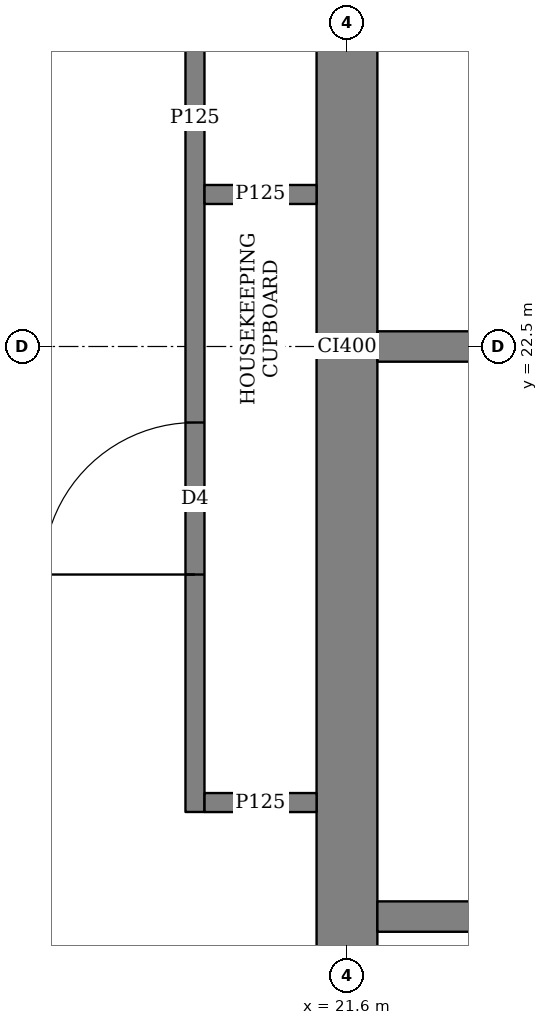
"""IFC4 building model, lengths in metres.
Left out: names, types, materials, properties, quantities, classifications, styles, units other than length and angle.
Written with IfcOpenShell. Run it as: python <this file> out.ifc"""

import sys

from ifc_helpers import new_model, si_unit, direction, frame, frame_2d, origin, place, context, subcontext, project, spatial, rectangle, extrude, element, fill, save


model = new_model("IFC4")
c1 = context("Model", 3, precision=1e-05, world=origin(), true_north=direction((0.0, 1.0)))
c2 = subcontext(c1, "Body", "Model", "MODEL_VIEW")
j1 = project(units=[si_unit("LENGTHUNIT", "METRE"), si_unit("PLANEANGLEUNIT", "RADIAN")], contexts=[c1])
p1 = place(None, origin())
s1 = spatial("IfcSite", under=j1, at=p1, CompositionType="ELEMENT")
p2 = place(p1, origin())
s2 = spatial("IfcBuilding", under=s1, at=p2, CompositionType="ELEMENT")
p3 = place(p2, frame((0.0, 0.0, 89.15)))
s3 = spatial("IfcBuildingStorey", under=s2, at=p3, CompositionType="ELEMENT", Elevation=89.15)
p4 = place(p3, frame((21.6, 15.45, 0.0), z_axis=(0.0, 0.0, 1.0), x_axis=(0.0, 1.0, 0.0)))
e1 = element("IfcWall", 1, at=p4, inside=s3, PredefinedType="SHEAR", context=c2, shape_type="SweptSolid", body=[
    extrude(rectangle(XDim=14.1, YDim=0.4, at=frame_2d((7.05, 0.0))), origin(), (0.0, 0.0, 1.0), 3.75),
])
p5 = place(p3, frame((20.6, 19.438, 0.0), z_axis=(0.0, 0.0, 1.0), x_axis=(0.0, 1.0, 0.0)))
e2 = element("IfcWall", 2, at=p5, inside=s3, PredefinedType="PARTITIONING", context=c2, shape_type="SweptSolid", body=[
    extrude(rectangle(XDim=9.124, YDim=0.125, at=frame_2d((4.562, 0.0))), origin(), (0.0, 0.0, 1.0), 3.5),
])
p6 = place(p5, frame((1.562, 0.0, 0.0)))
e3 = element("IfcOpeningElement", 3, at=p6, cuts=e2, PredefinedType="OPENING", context=c2, shape_type="SweptSolid", body=[
    extrude(rectangle(XDim=1.0, YDim=2.1, at=frame_2d((0.5, 1.05))), frame((0.0, 0.073, 0.0), z_axis=(0.0, -1.0, 0.0), x_axis=(1.0, 0.0, 0.0)), (0.0, 0.0, 1.0), 0.145),
])
p7 = place(p5, frame((6.062, 0.0, 0.0)))
e4 = element("IfcOpeningElement", 4, at=p7, cuts=e2, PredefinedType="OPENING", context=c2, shape_type="SweptSolid", body=[
    extrude(rectangle(XDim=1.0, YDim=2.1, at=frame_2d((0.5, 1.05))), frame((0.0, 0.073, 0.0), z_axis=(0.0, -1.0, 0.0), x_axis=(1.0, 0.0, 0.0)), (0.0, 0.0, 1.0), 0.145),
])
for number, where, z_axis, x_axis in (
    (5, (20.663, 19.5, 0.0), (0.0, 0.0, 1.0), (1.0, 0.0, 0.0)),
    (6, (20.663, 23.5, 0.0), (0.0, 0.0, 1.0), (1.0, 0.0, 0.0)),
):
    element("IfcWall", number, at=place(p3, frame(where, z_axis=z_axis, x_axis=x_axis)), inside=s3, PredefinedType="PARTITIONING", context=c2, shape_type="SweptSolid", body=[
        extrude(rectangle(XDim=0.737, YDim=0.125, at=frame_2d((0.368, 0.0))), origin(), (0.0, 0.0, 1.0), 3.5),
    ])
for number, where, z_axis, x_axis in (
    (7, (21.8, 18.75, 0.0), (0.0, 0.0, 1.0), (1.0, 0.0, 0.0)),
    (8, (21.8, 22.5, 0.0), (0.0, 0.0, 1.0), (1.0, 0.0, 0.0)),
):
    element("IfcWall", number, at=place(p3, frame(where, z_axis=z_axis, x_axis=x_axis)), inside=s3, PredefinedType="SOLIDWALL", context=c2, shape_type="SweptSolid", body=[
        extrude(rectangle(XDim=2.2, YDim=0.2, at=frame_2d((1.1, 0.0))), origin(), (0.0, 0.0, 1.0), 3.5),
    ])
p8 = place(p6, origin())
e9 = element("IfcDoor", 9, at=p8, inside=s3, OperationType="SINGLE_SWING_LEFT", PredefinedType="DOOR", context=c2, shape_type="SweptSolid", body=[
    extrude(rectangle(XDim=1.0, YDim=2.1, at=frame_2d((0.5, 1.05))), frame((0.0, 0.025, 0.0), z_axis=(0.0, -1.0, 0.0), x_axis=(1.0, 0.0, 0.0)), (0.0, 0.0, 1.0), 0.05),
])
fill(e3, e9)
save(model, sys.argv[1])
